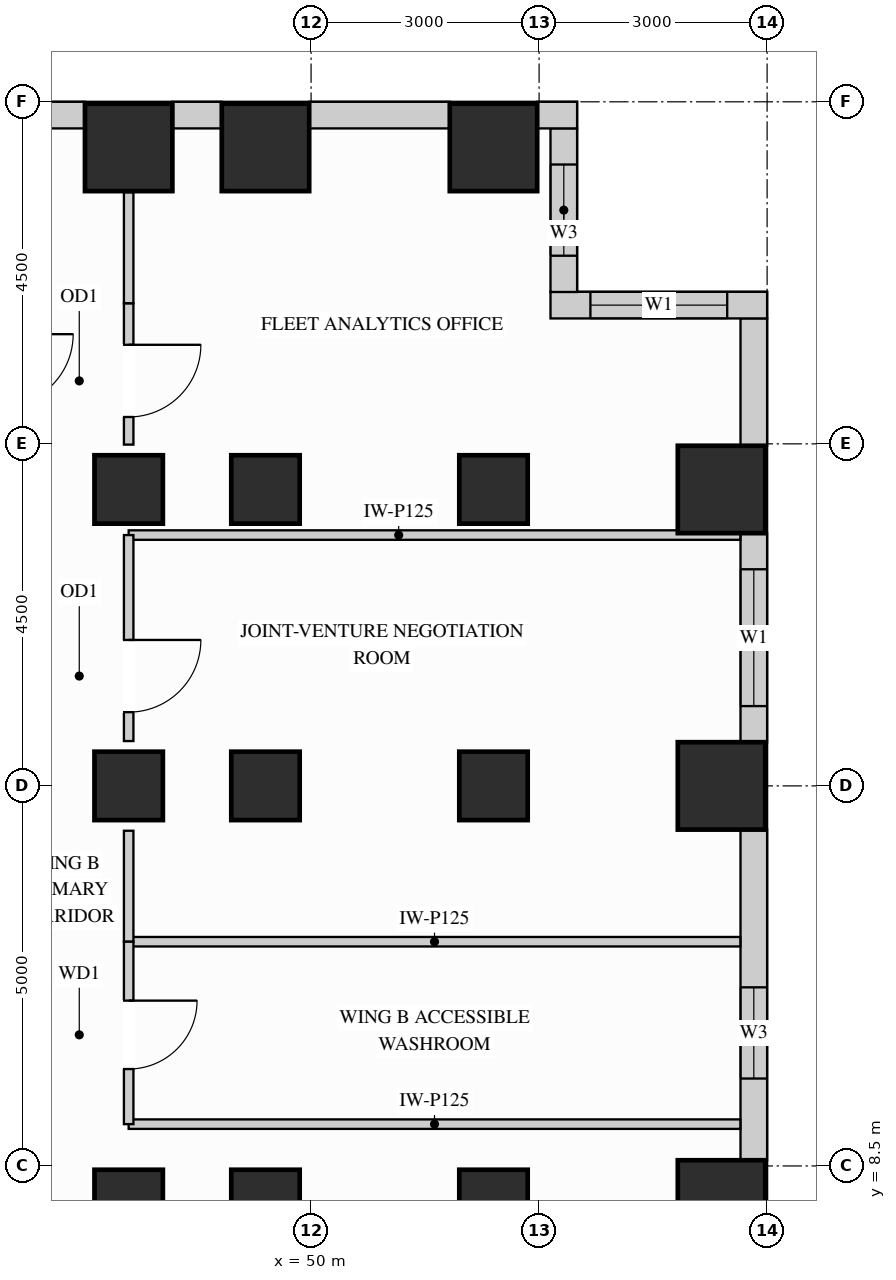
"""IFC4 building model, lengths in metres.
Left out: names, types, materials, properties, quantities, classifications, styles, units other than length and angle.
Written with IfcOpenShell. Run it as: python <this file> out.ifc"""

import sys

from ifc_helpers import new_model, si_unit, direction, frame, frame_2d, origin, origin_2d, place, context, subcontext, project, spatial, rectangle, extrude, source, transform, mapped, element, fill, save


model = new_model("IFC4")
c1 = context("Model", 3, precision=1e-05, world=origin(), true_north=direction((0.0, 1.0)))
c2 = subcontext(c1, "Body", "Model", "MODEL_VIEW")
j1 = project(units=[si_unit("LENGTHUNIT", "METRE"), si_unit("PLANEANGLEUNIT", "RADIAN")], contexts=[c1])
p1 = place(None, origin())
s1 = spatial("IfcSite", under=j1, at=p1, CompositionType="ELEMENT")
p2 = place(p1, origin())
s2 = spatial("IfcBuilding", under=s1, at=p2, CompositionType="ELEMENT")
p3 = place(p2, frame((0.0, 0.0, 99.0)))
s3 = spatial("IfcBuildingStorey", under=s2, at=p3, CompositionType="ELEMENT", Elevation=99.0)
m1 = source(origin(), c2, "Body", "SweptSolid", [
    extrude(rectangle(XDim=0.9, YDim=0.9, at=origin_2d()), origin(), (0.0, 0.0, 1.0), 3.38),
])
for number, where, z_axis, x_axis in (
    (1, (47.6, 13.5, 0.0), (0.0, 0.0, 1.0), (1.0, 0.0, 0.0)),
    (2, (47.6, 8.0, 0.0), (0.0, 0.0, 1.0), (1.0, 0.0, 0.0)),
    (3, (47.6, 17.4, 0.0), (0.0, 0.0, 1.0), (1.0, 0.0, 0.0)),
    (4, (49.4, 13.5, 0.0), (0.0, 0.0, 1.0), (1.0, 0.0, 0.0)),
    (5, (49.4, 17.4, 0.0), (0.0, 0.0, 1.0), (1.0, 0.0, 0.0)),
    (6, (49.4, 8.0, 0.0), (0.0, 0.0, 1.0), (1.0, 0.0, 0.0)),
    (7, (52.4, 13.5, 0.0), (0.0, 0.0, 1.0), (1.0, 0.0, 0.0)),
    (8, (52.4, 17.4, 0.0), (0.0, 0.0, 1.0), (1.0, 0.0, 0.0)),
    (9, (52.4, 8.0, 0.0), (0.0, 0.0, 1.0), (1.0, 0.0, 0.0)),
):
    element("IfcColumn", number, at=place(p3, frame(where, z_axis=z_axis, x_axis=x_axis)), inside=s3, PredefinedType="COLUMN", context=c2, shape_type="MappedRepresentation", body=[
        mapped(m1, transform((0.0, 0.0, 0.0), x_axis=(1.0, 0.0, 0.0), y_axis=(0.0, 1.0, 0.0), z_axis=(0.0, 0.0, 1.0))),
    ])
m2 = source(origin(), c2, "Body", "SweptSolid", [
    extrude(rectangle(XDim=1.15, YDim=1.15, at=origin_2d()), origin(), (0.0, 0.0, 1.0), 3.38),
])
for number, where, z_axis, x_axis in (
    (10, (47.6, 21.9, 0.0), (0.0, 0.0, 1.0), (1.0, 0.0, 0.0)),
    (11, (49.4, 21.9, 0.0), (0.0, 0.0, 1.0), (1.0, 0.0, 0.0)),
    (12, (52.4, 21.9, 0.0), (0.0, 0.0, 1.0), (1.0, 0.0, 0.0)),
    (13, (55.4, 13.5, 0.0), (0.0, 0.0, 1.0), (1.0, 0.0, 0.0)),
    (14, (55.4, 17.4, 0.0), (0.0, 0.0, 1.0), (1.0, 0.0, 0.0)),
    (15, (55.4, 8.0, 0.0), (0.0, 0.0, 1.0), (1.0, 0.0, 0.0)),
):
    element("IfcColumn", number, at=place(p3, frame(where, z_axis=z_axis, x_axis=x_axis)), inside=s3, PredefinedType="COLUMN", context=c2, shape_type="MappedRepresentation", body=[
        mapped(m2, transform((0.0, 0.0, 0.0), x_axis=(1.0, 0.0, 0.0), y_axis=(0.0, 1.0, 0.0), z_axis=(0.0, 0.0, 1.0))),
    ])
p4 = place(p3, frame((55.825, 8.573, 0.0), z_axis=(0.0, 0.0, 1.0), x_axis=(0.0, 1.0, 0.0)))
e16 = element("IfcWall", 16, at=p4, inside=s3, PredefinedType="SOLIDWALL", context=c2, shape_type="SweptSolid", body=[
    extrude(rectangle(XDim=4.354, YDim=0.35, at=frame_2d((2.177, 0.0))), origin(), (0.0, 0.0, 1.0), 3.365),
])
p5 = place(p4, frame((1.077, 0.0, 0.78)))
e17 = element("IfcOpeningElement", 17, at=p5, cuts=e16, PredefinedType="OPENING", context=c2, shape_type="SweptSolid", body=[
    extrude(rectangle(XDim=1.2, YDim=2.1, at=frame_2d((0.6, 1.05))), frame((0.0, 0.185, 0.0), z_axis=(0.0, -1.0, 0.0), x_axis=(1.0, 0.0, 0.0)), (0.0, 0.0, 1.0), 0.37),
])
p6 = place(p3, frame((55.825, 14.073, 0.0), z_axis=(0.0, 0.0, 1.0), x_axis=(0.0, 1.0, 0.0)))
e18 = element("IfcWall", 18, at=p6, inside=s3, PredefinedType="SOLIDWALL", context=c2, shape_type="SweptSolid", body=[
    extrude(rectangle(XDim=2.754, YDim=0.35, at=frame_2d((1.377, 0.0))), origin(), (0.0, 0.0, 1.0), 3.365),
])
p7 = place(p6, frame((0.477, 0.0, 0.78)))
e19 = element("IfcOpeningElement", 19, at=p7, cuts=e18, PredefinedType="OPENING", context=c2, shape_type="SweptSolid", body=[
    extrude(rectangle(XDim=1.8, YDim=2.1, at=frame_2d((0.9, 1.05))), frame((0.0, 0.185, 0.0), z_axis=(0.0, -1.0, 0.0), x_axis=(1.0, 0.0, 0.0)), (0.0, 0.0, 1.0), 0.37),
])
m3 = source(origin(), c2, "Body", "SweptSolid", [
    extrude(rectangle(XDim=1.679, YDim=0.35, at=frame_2d((0.84, 0.0))), origin(), (0.0, 0.0, 1.0), 3.365),
])
p8 = place(p3, frame((55.825, 17.973, 0.0), z_axis=(0.0, 0.0, 1.0), x_axis=(0.0, 1.0, 0.0)))
e20 = element("IfcWall", 20, at=p8, inside=s3, PredefinedType="SOLIDWALL", context=c2, shape_type="MappedRepresentation", body=[
    mapped(m3, transform((0.0, 0.0, 0.0), x_axis=(1.0, 0.0, 0.0), y_axis=(0.0, 1.0, 0.0), z_axis=(0.0, 0.0, 1.0))),
])
p9 = place(p3, frame((56.0, 19.825, 0.0), z_axis=(0.0, 0.0, 1.0), x_axis=(-1.0, 0.0, 0.0)))
e21 = element("IfcWall", 21, at=p9, inside=s3, PredefinedType="SOLIDWALL", context=c2, shape_type="SweptSolid", body=[
    extrude(rectangle(XDim=2.85, YDim=0.35, at=frame_2d((1.425, 0.0))), origin(), (0.0, 0.0, 1.0), 3.365),
])
p10 = place(p9, frame((0.525, 0.0, 0.78)))
e22 = element("IfcOpeningElement", 22, at=p10, cuts=e21, PredefinedType="OPENING", context=c2, shape_type="SweptSolid", body=[
    extrude(rectangle(XDim=1.8, YDim=2.1, at=frame_2d((0.9, 1.05))), frame((0.0, 0.185, 0.0), z_axis=(0.0, -1.0, 0.0), x_axis=(1.0, 0.0, 0.0)), (0.0, 0.0, 1.0), 0.37),
])
p11 = place(p3, frame((53.325, 19.998, 0.0), z_axis=(0.0, 0.0, 1.0), x_axis=(0.0, 1.0, 0.0)))
e23 = element("IfcWall", 23, at=p11, inside=s3, PredefinedType="SOLIDWALL", context=c2, shape_type="SweptSolid", body=[
    extrude(rectangle(XDim=2.154, YDim=0.35, at=frame_2d((1.077, 0.0))), origin(), (0.0, 0.0, 1.0), 3.365),
])
p12 = place(p11, frame((0.477, 0.0, 0.78)))
e24 = element("IfcOpeningElement", 24, at=p12, cuts=e23, PredefinedType="OPENING", context=c2, shape_type="SweptSolid", body=[
    extrude(rectangle(XDim=1.2, YDim=2.1, at=frame_2d((0.6, 1.05))), frame((0.0, 0.185, 0.0), z_axis=(0.0, -1.0, 0.0), x_axis=(1.0, 0.0, 0.0)), (0.0, 0.0, 1.0), 0.37),
])
m4 = source(origin(), c2, "Body", "SweptSolid", [
    extrude(rectangle(XDim=0.527, YDim=0.35, at=frame_2d((0.264, 0.0))), origin(), (0.0, 0.0, 1.0), 3.365),
])
p13 = place(p3, frame((53.5, 22.325, 0.0), z_axis=(0.0, 0.0, 1.0), x_axis=(-1.0, 0.0, 0.0)))
e25 = element("IfcWall", 25, at=p13, inside=s3, PredefinedType="SOLIDWALL", context=c2, shape_type="MappedRepresentation", body=[
    mapped(m4, transform((0.0, 0.0, 0.0), x_axis=(1.0, 0.0, 0.0), y_axis=(0.0, 1.0, 0.0), z_axis=(0.0, 0.0, 1.0))),
])
m5 = source(origin(), c2, "Body", "SweptSolid", [
    extrude(rectangle(XDim=1.854, YDim=0.35, at=frame_2d((0.927, 0.0))), origin(), (0.0, 0.0, 1.0), 3.365),
])
p14 = place(p3, frame((51.827, 22.325, 0.0), z_axis=(0.0, 0.0, 1.0), x_axis=(-1.0, 0.0, 0.0)))
e26 = element("IfcWall", 26, at=p14, inside=s3, PredefinedType="SOLIDWALL", context=c2, shape_type="MappedRepresentation", body=[
    mapped(m5, transform((0.0, 0.0, 0.0), x_axis=(1.0, 0.0, 0.0), y_axis=(0.0, 1.0, 0.0), z_axis=(0.0, 0.0, 1.0))),
])
m6 = source(origin(), c2, "Body", "SweptSolid", [
    extrude(rectangle(XDim=0.654, YDim=0.35, at=frame_2d((0.327, 0.0))), origin(), (0.0, 0.0, 1.0), 3.365),
])
p15 = place(p3, frame((48.827, 22.325, 0.0), z_axis=(0.0, 0.0, 1.0), x_axis=(-1.0, 0.0, 0.0)))
e27 = element("IfcWall", 27, at=p15, inside=s3, PredefinedType="SOLIDWALL", context=c2, shape_type="MappedRepresentation", body=[
    mapped(m6, transform((0.0, 0.0, 0.0), x_axis=(1.0, 0.0, 0.0), y_axis=(0.0, 1.0, 0.0), z_axis=(0.0, 0.0, 1.0))),
])
p16 = place(p3, frame((47.027, 22.325, 0.0), z_axis=(0.0, 0.0, 1.0), x_axis=(-1.0, 0.0, 0.0)))
e28 = element("IfcWall", 28, at=p16, inside=s3, PredefinedType="SOLIDWALL", context=c2, shape_type="SweptSolid", body=[
    extrude(rectangle(XDim=6.454, YDim=0.35, at=frame_2d((3.227, 0.0))), origin(), (0.0, 0.0, 1.0), 3.365),
])
p17 = place(p16, frame((1.749, 0.0, 0.78)))
e29 = element("IfcOpeningElement", 29, at=p17, cuts=e28, PredefinedType="OPENING", context=c2, shape_type="SweptSolid", body=[
    extrude(rectangle(XDim=1.8, YDim=2.1, at=frame_2d((0.9, 1.05))), frame((0.0, 0.185, 0.0), z_axis=(0.0, -1.0, 0.0), x_axis=(1.0, 0.0, 0.0)), (0.0, 0.0, 1.0), 0.37),
])
p18 = place(p16, frame((3.942, 0.0, 0.78)))
e30 = element("IfcOpeningElement", 30, at=p18, cuts=e28, PredefinedType="OPENING", context=c2, shape_type="SweptSolid", body=[
    extrude(rectangle(XDim=1.8, YDim=2.1, at=frame_2d((0.9, 1.05))), frame((0.0, 0.185, 0.0), z_axis=(0.0, -1.0, 0.0), x_axis=(1.0, 0.0, 0.0)), (0.0, 0.0, 1.0), 0.37),
])
m7 = source(origin(), c2, "Body", "SweptSolid", [
    extrude(rectangle(XDim=8.048, YDim=0.125, at=frame_2d((4.024, 0.0))), origin(), (0.0, 0.0, 1.0), 3.365),
])
for number, where, z_axis, x_axis in (
    (31, (47.6, 11.45, 0.0), (0.0, 0.0, 1.0), (1.0, 0.0, 0.0)),
    (32, (47.6, 16.8, 0.0), (0.0, 0.0, 1.0), (1.0, 0.0, 0.0)),
    (33, (47.6, 9.05, 0.0), (0.0, 0.0, 1.0), (1.0, 0.0, 0.0)),
):
    element("IfcWall", number, at=place(p3, frame(where, z_axis=z_axis, x_axis=x_axis)), inside=s3, PredefinedType="PARTITIONING", context=c2, shape_type="MappedRepresentation", body=[
        mapped(m7, transform((0.0, 0.0, 0.0), x_axis=(1.0, 0.0, 0.0), y_axis=(0.0, 1.0, 0.0), z_axis=(0.0, 0.0, 1.0))),
    ])
m8 = source(origin(), c2, "Body", "SweptSolid", [
    extrude(rectangle(XDim=1.46, YDim=0.125, at=frame_2d((0.73, 0.0))), origin(), (0.0, 0.0, 1.0), 2.677),
])
p19 = place(p3, frame((47.6, 11.45, 0.0), z_axis=(0.0, 0.0, 1.0), x_axis=(0.0, 1.0, 0.0)))
e34 = element("IfcWall", 34, at=p19, inside=s3, PredefinedType="PARTITIONING", context=c2, shape_type="MappedRepresentation", body=[
    mapped(m8, transform((0.0, 0.0, 0.0), x_axis=(1.0, 0.0, 0.0), y_axis=(0.0, 1.0, 0.0), z_axis=(0.0, 0.0, 1.0))),
])
p20 = place(p3, frame((47.6, 14.09, 0.0), z_axis=(0.0, 0.0, 1.0), x_axis=(0.0, 1.0, 0.0)))
e35 = element("IfcWall", 35, at=p20, inside=s3, PredefinedType="PARTITIONING", context=c2, shape_type="SweptSolid", body=[
    extrude(rectangle(XDim=2.71, YDim=0.125, at=frame_2d((1.355, 0.0))), origin(), (0.0, 0.0, 1.0), 2.677),
])
p21 = place(p20, frame((0.38, 0.0, 0.0)))
e36 = element("IfcOpeningElement", 36, at=p21, cuts=e35, PredefinedType="OPENING", context=c2, shape_type="SweptSolid", body=[
    extrude(rectangle(XDim=0.95, YDim=2.15, at=frame_2d((0.475, 1.075))), frame((0.0, 0.073, 0.0), z_axis=(0.0, -1.0, 0.0), x_axis=(1.0, 0.0, 0.0)), (0.0, 0.0, 1.0), 0.145),
])
p22 = place(p3, frame((47.6, 17.99, 0.0), z_axis=(0.0, 0.0, 1.0), x_axis=(0.0, 1.0, 0.0)))
e37 = element("IfcWall", 37, at=p22, inside=s3, PredefinedType="PARTITIONING", context=c2, shape_type="SweptSolid", body=[
    extrude(rectangle(XDim=1.86, YDim=0.125, at=frame_2d((0.93, 0.0))), origin(), (0.0, 0.0, 1.0), 2.677),
])
p23 = place(p22, frame((0.363, 0.0, 0.0)))
e38 = element("IfcOpeningElement", 38, at=p23, cuts=e37, PredefinedType="OPENING", context=c2, shape_type="SweptSolid", body=[
    extrude(rectangle(XDim=0.95, YDim=2.15, at=frame_2d((0.475, 1.075))), frame((0.0, 0.073, 0.0), z_axis=(0.0, -1.0, 0.0), x_axis=(1.0, 0.0, 0.0)), (0.0, 0.0, 1.0), 0.145),
])
p24 = place(p3, frame((47.6, 19.85, 0.0), z_axis=(0.0, 0.0, 1.0), x_axis=(0.0, 1.0, 0.0)))
e39 = element("IfcWall", 39, at=p24, inside=s3, PredefinedType="PARTITIONING", context=c2, shape_type="MappedRepresentation", body=[
    mapped(m8, transform((0.0, 0.0, 0.0), x_axis=(1.0, 0.0, 0.0), y_axis=(0.0, 1.0, 0.0), z_axis=(0.0, 0.0, 1.0))),
])
p25 = place(p3, frame((47.6, 9.05, 0.0), z_axis=(0.0, 0.0, 1.0), x_axis=(0.0, 1.0, 0.0)))
e40 = element("IfcWall", 40, at=p25, inside=s3, PredefinedType="PARTITIONING", context=c2, shape_type="SweptSolid", body=[
    extrude(rectangle(XDim=2.4, YDim=0.125, at=frame_2d((1.2, 0.0))), origin(), (0.0, 0.0, 1.0), 2.677),
])
p26 = place(p25, frame((0.725, 0.0, 0.0)))
e41 = element("IfcOpeningElement", 41, at=p26, cuts=e40, PredefinedType="OPENING", context=c2, shape_type="SweptSolid", body=[
    extrude(rectangle(XDim=0.9, YDim=2.15, at=frame_2d((0.45, 1.075))), frame((0.0, 0.073, 0.0), z_axis=(0.0, -1.0, 0.0), x_axis=(1.0, 0.0, 0.0)), (0.0, 0.0, 1.0), 0.145),
])
m9 = source(origin(), c2, "Body", "SweptSolid", [
    extrude(rectangle(XDim=0.95, YDim=2.15, at=frame_2d((0.475, 1.075))), frame((0.0, 0.025, 0.0), z_axis=(0.0, -1.0, 0.0), x_axis=(1.0, 0.0, 0.0)), (0.0, 0.0, 1.0), 0.05),
])
p27 = place(p21, origin())
e42 = element("IfcDoor", 42, at=p27, inside=s3, OperationType="SINGLE_SWING_RIGHT", PredefinedType="DOOR", context=c2, shape_type="MappedRepresentation", body=[
    mapped(m9, transform((0.0, 0.0, 0.0), x_axis=(1.0, 0.0, 0.0), y_axis=(0.0, 1.0, 0.0), z_axis=(0.0, 0.0, 1.0))),
])
fill(e36, e42)
p28 = place(p23, origin())
e43 = element("IfcDoor", 43, at=p28, inside=s3, OperationType="SINGLE_SWING_RIGHT", PredefinedType="DOOR", context=c2, shape_type="MappedRepresentation", body=[
    mapped(m9, transform((0.0, 0.0, 0.0), x_axis=(1.0, 0.0, 0.0), y_axis=(0.0, 1.0, 0.0), z_axis=(0.0, 0.0, 1.0))),
])
fill(e38, e43)
m10 = source(origin(), c2, "Body", "SweptSolid", [
    extrude(rectangle(XDim=0.9, YDim=2.15, at=frame_2d((0.45, 1.075))), frame((0.0, 0.025, 0.0), z_axis=(0.0, -1.0, 0.0), x_axis=(1.0, 0.0, 0.0)), (0.0, 0.0, 1.0), 0.05),
])
p29 = place(p26, origin())
e44 = element("IfcDoor", 44, at=p29, inside=s3, OperationType="SINGLE_SWING_RIGHT", PredefinedType="DOOR", context=c2, shape_type="MappedRepresentation", body=[
    mapped(m10, transform((0.0, 0.0, 0.0), x_axis=(1.0, 0.0, 0.0), y_axis=(0.0, 1.0, 0.0), z_axis=(0.0, 0.0, 1.0))),
])
fill(e41, e44)
m11 = source(origin(), c2, "Body", "SweptSolid", [
    extrude(rectangle(XDim=1.8, YDim=2.1, at=frame_2d((0.9, 1.05))), frame((0.0, 0.03, 0.0), z_axis=(0.0, -1.0, 0.0), x_axis=(1.0, 0.0, 0.0)), (0.0, 0.0, 1.0), 0.06),
])
p30 = place(p7, origin())
e45 = element("IfcWindow", 45, at=p30, inside=s3, PartitioningType="SINGLE_PANEL", PredefinedType="WINDOW", context=c2, shape_type="MappedRepresentation", body=[
    mapped(m11, transform((0.0, 0.0, 0.0), x_axis=(1.0, 0.0, 0.0), y_axis=(0.0, 1.0, 0.0), z_axis=(0.0, 0.0, 1.0))),
])
fill(e19, e45)
p31 = place(p10, origin())
e46 = element("IfcWindow", 46, at=p31, inside=s3, PartitioningType="SINGLE_PANEL", PredefinedType="WINDOW", context=c2, shape_type="MappedRepresentation", body=[
    mapped(m11, transform((0.0, 0.0, 0.0), x_axis=(1.0, 0.0, 0.0), y_axis=(0.0, 1.0, 0.0), z_axis=(0.0, 0.0, 1.0))),
])
fill(e22, e46)
m12 = source(origin(), c2, "Body", "SweptSolid", [
    extrude(rectangle(XDim=1.2, YDim=2.1, at=frame_2d((0.6, 1.05))), frame((0.0, 0.03, 0.0), z_axis=(0.0, -1.0, 0.0), x_axis=(1.0, 0.0, 0.0)), (0.0, 0.0, 1.0), 0.06),
])
p32 = place(p5, origin())
e47 = element("IfcWindow", 47, at=p32, inside=s3, PartitioningType="SINGLE_PANEL", PredefinedType="WINDOW", context=c2, shape_type="MappedRepresentation", body=[
    mapped(m12, transform((0.0, 0.0, 0.0), x_axis=(1.0, 0.0, 0.0), y_axis=(0.0, 1.0, 0.0), z_axis=(0.0, 0.0, 1.0))),
])
fill(e17, e47)
p33 = place(p12, origin())
e48 = element("IfcWindow", 48, at=p33, inside=s3, PartitioningType="SINGLE_PANEL", PredefinedType="WINDOW", context=c2, shape_type="MappedRepresentation", body=[
    mapped(m12, transform((0.0, 0.0, 0.0), x_axis=(1.0, 0.0, 0.0), y_axis=(0.0, 1.0, 0.0), z_axis=(0.0, 0.0, 1.0))),
])
fill(e24, e48)
save(model, sys.argv[1])
